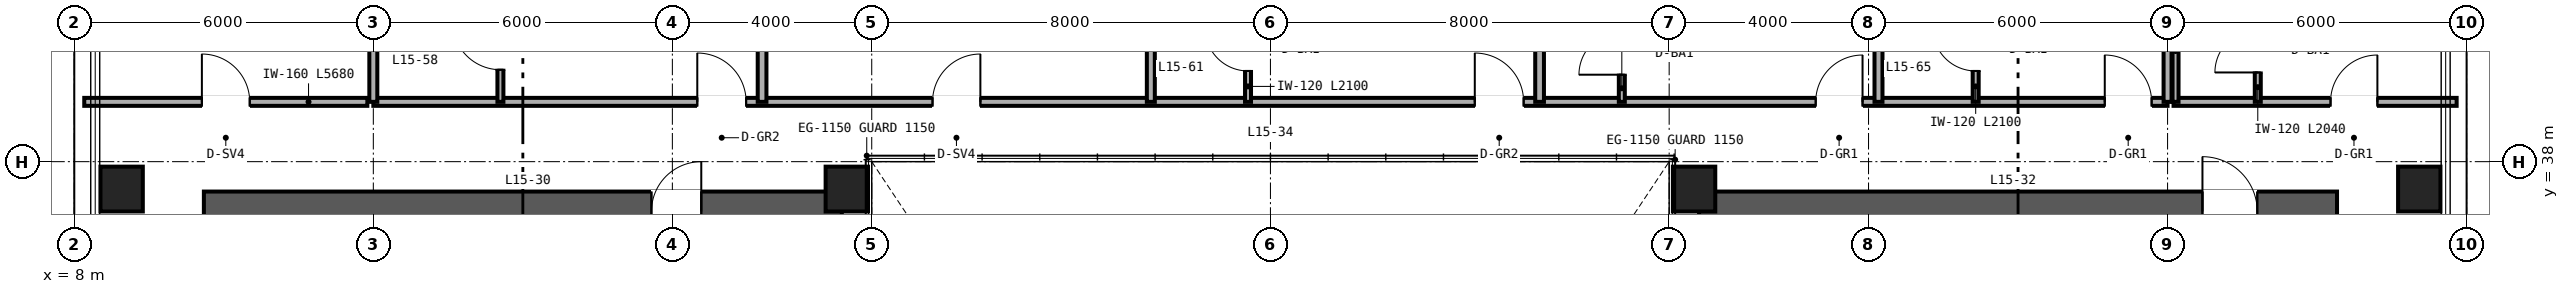
"""IFC4 building model, lengths in metres.
Left out: names, types, materials, properties, quantities, classifications, styles, units other than length and angle.
Written with IfcOpenShell. Run it as: python <this file> out.ifc"""

import sys

from ifc_helpers import new_model, si_unit, direction, frame, frame_2d, origin, origin_2d, place, context, subcontext, project, spatial, rectangle, hollow_rectangle, extrude, source, transform, mapped, element, fill, save


model = new_model("IFC4")
c1 = context("Model", 3, precision=1e-05, world=origin(), true_north=direction((0.0, 1.0)))
c2 = subcontext(c1, "Body", "Model", "MODEL_VIEW")
j1 = project(units=[si_unit("LENGTHUNIT", "METRE"), si_unit("PLANEANGLEUNIT", "RADIAN")], contexts=[c1])
p1 = place(None, origin())
s1 = spatial("IfcSite", under=j1, at=p1, CompositionType="ELEMENT")
p2 = place(p1, origin())
s2 = spatial("IfcBuilding", under=s1, at=p2, CompositionType="ELEMENT")
p3 = place(p2, frame((0.0, 0.0, 63.6)))
s3 = spatial("IfcBuildingStorey", under=s2, at=p3, CompositionType="ELEMENT", Elevation=63.6)
p4 = place(p3, frame((10.6, 37.0, 0.0), z_axis=(0.0, 0.0, 1.0), x_axis=(1.0, 0.0, 0.0)))
e1 = element("IfcWall", 1, at=p4, inside=s3, PredefinedType="SHEAR", context=c2, shape_type="SweptSolid", body=[
    extrude(rectangle(XDim=12.8, YDim=0.8, at=frame_2d((6.4, 0.0))), origin(), (0.0, 0.0, 1.0), 3.35),
])
p5 = place(p4, frame((8.98, 0.0, 0.0)))
e2 = element("IfcOpeningElement", 2, at=p5, cuts=e1, PredefinedType="OPENING", context=c2, shape_type="SweptSolid", body=[
    extrude(rectangle(XDim=1.0, YDim=2.15, at=frame_2d((0.5, 1.075))), frame((0.0, 0.41, 0.0), z_axis=(0.0, -1.0, 0.0), x_axis=(1.0, 0.0, 0.0)), (0.0, 0.0, 1.0), 0.82),
])
p6 = place(p3, frame((40.6, 37.0, 0.0), z_axis=(0.0, 0.0, 1.0), x_axis=(1.0, 0.0, 0.0)))
e3 = element("IfcWall", 3, at=p6, inside=s3, PredefinedType="SHEAR", context=c2, shape_type="SweptSolid", body=[
    extrude(rectangle(XDim=12.8, YDim=0.8, at=frame_2d((6.4, 0.0))), origin(), (0.0, 0.0, 1.0), 3.35),
])
p7 = place(p6, frame((10.1, 0.0, 0.0)))
e4 = element("IfcOpeningElement", 4, at=p7, cuts=e3, PredefinedType="OPENING", context=c2, shape_type="SweptSolid", body=[
    extrude(rectangle(XDim=1.1, YDim=2.15, at=frame_2d((0.55, 1.075))), frame((0.0, 0.41, 0.0), z_axis=(0.0, -1.0, 0.0), x_axis=(1.0, 0.0, 0.0)), (0.0, 0.0, 1.0), 0.82),
])
m1 = source(origin(), c2, "Body", "SweptSolid", [
    extrude(hollow_rectangle(XDim=0.85, YDim=0.9, WallThickness=0.04, at=origin_2d()), origin(), (0.0, 0.0, 1.0), 3.35),
])
for number, where, z_axis, x_axis in (
    (5, (8.95, 37.45, 0.0), (0.0, 0.0, 1.0), (1.0, 0.0, 0.0)),
    (6, (23.5, 37.45, 0.0), (0.0, 0.0, 1.0), (1.0, 0.0, 0.0)),
    (7, (40.5, 37.45, 0.0), (0.0, 0.0, 1.0), (1.0, 0.0, 0.0)),
    (8, (55.05, 37.45, 0.0), (0.0, 0.0, 1.0), (1.0, 0.0, 0.0)),
):
    element("IfcColumn", number, at=place(p3, frame(where, z_axis=z_axis, x_axis=x_axis)), inside=s3, PredefinedType="COLUMN", context=c2, shape_type="MappedRepresentation", body=[
        mapped(m1, transform((0.0, 0.0, 0.0), scale=1.0)),
    ])
p8 = place(p3, frame((8.2, 39.2, 0.0), z_axis=(0.0, 0.0, 1.0), x_axis=(1.0, 0.0, 0.0)))
e9 = element("IfcWall", 9, at=p8, inside=s3, PredefinedType="PARTITIONING", context=c2, shape_type="SweptSolid", body=[
    extrude(rectangle(XDim=5.68, YDim=0.16, at=frame_2d((2.84, 0.0))), origin(), (0.0, 0.0, 1.0), 3.35),
])
p9 = place(p8, frame((2.36, 0.0, 0.0)))
e10 = element("IfcOpeningElement", 10, at=p9, cuts=e9, PredefinedType="OPENING", context=c2, shape_type="SweptSolid", body=[
    extrude(rectangle(XDim=0.96, YDim=2.15, at=frame_2d((0.48, 1.075))), frame((0.0, 0.09, 0.0), z_axis=(0.0, -1.0, 0.0), x_axis=(1.0, 0.0, 0.0)), (0.0, 0.0, 1.0), 0.18),
])
p10 = place(p3, frame((50.12, 39.2, 0.0), z_axis=(0.0, 0.0, 1.0), x_axis=(1.0, 0.0, 0.0)))
e11 = element("IfcWall", 11, at=p10, inside=s3, PredefinedType="PARTITIONING", context=c2, shape_type="SweptSolid", body=[
    extrude(rectangle(XDim=5.68, YDim=0.16, at=frame_2d((2.84, 0.0))), origin(), (0.0, 0.0, 1.0), 3.35),
])
p11 = place(p10, frame((3.15, 0.0, 0.0)))
e12 = element("IfcOpeningElement", 12, at=p11, cuts=e11, PredefinedType="OPENING", context=c2, shape_type="SweptSolid", body=[
    extrude(rectangle(XDim=0.94, YDim=2.15, at=frame_2d((0.47, 1.075))), frame((0.0, 0.09, 0.0), z_axis=(0.0, -1.0, 0.0), x_axis=(1.0, 0.0, 0.0)), (0.0, 0.0, 1.0), 0.18),
])
p12 = place(p3, frame((51.81, 39.2, 0.0), z_axis=(0.0, 0.0, 1.0), x_axis=(0.0, 1.0, 0.0)))
e13 = element("IfcWall", 13, at=p12, inside=s3, PredefinedType="PARTITIONING", context=c2, shape_type="SweptSolid", body=[
    extrude(rectangle(XDim=2.04, YDim=0.12, at=frame_2d((1.02, 0.0))), origin(), (0.0, 0.0, 1.0), 3.35),
])
p13 = place(p12, frame((0.59, 0.0, 0.0)))
e14 = element("IfcOpeningElement", 14, at=p13, cuts=e13, PredefinedType="OPENING", context=c2, shape_type="SweptSolid", body=[
    extrude(rectangle(XDim=0.86, YDim=2.1, at=frame_2d((0.43, 1.05))), frame((0.0, 0.07, 0.0), z_axis=(0.0, -1.0, 0.0), x_axis=(1.0, 0.0, 0.0)), (0.0, 0.0, 1.0), 0.14),
])
p14 = place(p3, frame((50.16, 39.2, 0.0), z_axis=(0.0, 0.0, 1.0), x_axis=(0.0, 1.0, 0.0)))
e15 = element("IfcWall", 15, at=p14, inside=s3, PredefinedType="PARTITIONING", context=c2, shape_type="SweptSolid", body=[
    extrude(rectangle(XDim=2.04, YDim=0.12, at=frame_2d((1.02, 0.0))), origin(), (0.0, 0.0, 1.0), 3.35),
])
p15 = place(p3, frame((14.0, 39.2, 0.0), z_axis=(0.0, 0.0, 1.0), x_axis=(1.0, 0.0, 0.0)))
e16 = element("IfcWall", 16, at=p15, inside=s3, PredefinedType="PARTITIONING", context=c2, shape_type="SweptSolid", body=[
    extrude(rectangle(XDim=36.0, YDim=0.16, at=frame_2d((18.0, 0.0))), origin(), (0.0, 0.0, 1.0), 2.571),
])
p16 = place(p15, frame((6.5, 0.0, 0.0)))
e17 = element("IfcOpeningElement", 17, at=p16, cuts=e16, PredefinedType="OPENING", context=c2, shape_type="SweptSolid", body=[
    extrude(rectangle(XDim=0.98, YDim=2.2, at=frame_2d((0.49, 1.1))), frame((0.0, 0.09, 0.0), z_axis=(0.0, -1.0, 0.0), x_axis=(1.0, 0.0, 0.0)), (0.0, 0.0, 1.0), 0.18),
])
p17 = place(p15, frame((11.22, 0.0, 0.0)))
e18 = element("IfcOpeningElement", 18, at=p17, cuts=e16, PredefinedType="OPENING", context=c2, shape_type="SweptSolid", body=[
    extrude(rectangle(XDim=0.96, YDim=2.15, at=frame_2d((0.48, 1.075))), frame((0.0, 0.09, 0.0), z_axis=(0.0, -1.0, 0.0), x_axis=(1.0, 0.0, 0.0)), (0.0, 0.0, 1.0), 0.18),
])
p18 = place(p15, frame((22.1, 0.0, 0.0)))
e19 = element("IfcOpeningElement", 19, at=p18, cuts=e16, PredefinedType="OPENING", context=c2, shape_type="SweptSolid", body=[
    extrude(rectangle(XDim=0.98, YDim=2.2, at=frame_2d((0.49, 1.1))), frame((0.0, 0.09, 0.0), z_axis=(0.0, -1.0, 0.0), x_axis=(1.0, 0.0, 0.0)), (0.0, 0.0, 1.0), 0.18),
])
p19 = place(p15, frame((28.94, 0.0, 0.0)))
e20 = element("IfcOpeningElement", 20, at=p19, cuts=e16, PredefinedType="OPENING", context=c2, shape_type="SweptSolid", body=[
    extrude(rectangle(XDim=0.94, YDim=2.15, at=frame_2d((0.47, 1.075))), frame((0.0, 0.09, 0.0), z_axis=(0.0, -1.0, 0.0), x_axis=(1.0, 0.0, 0.0)), (0.0, 0.0, 1.0), 0.18),
])
p20 = place(p15, frame((34.74, 0.0, 0.0)))
e21 = element("IfcOpeningElement", 21, at=p20, cuts=e16, PredefinedType="OPENING", context=c2, shape_type="SweptSolid", body=[
    extrude(rectangle(XDim=0.94, YDim=2.15, at=frame_2d((0.47, 1.075))), frame((0.0, 0.09, 0.0), z_axis=(0.0, -1.0, 0.0), x_axis=(1.0, 0.0, 0.0)), (0.0, 0.0, 1.0), 0.18),
])
for number, where, z_axis, x_axis in (
    (22, (14.0, 39.2, 0.0), (0.0, 0.0, 1.0), (0.0, 1.0, 0.0)),
    (23, (50.0, 39.2, 0.0), (0.0, 0.0, 1.0), (0.0, 1.0, 0.0)),
):
    element("IfcWall", number, at=place(p3, frame(where, z_axis=z_axis, x_axis=x_axis)), inside=s3, PredefinedType="PARTITIONING", context=c2, shape_type="SweptSolid", body=[
        extrude(rectangle(XDim=10.44, YDim=0.16, at=frame_2d((5.22, 0.0))), origin(), (0.0, 0.0, 1.0), 2.657),
    ])
p21 = place(p3, frame((21.8, 39.2, 0.0), z_axis=(0.0, 0.0, 1.0), x_axis=(0.0, 1.0, 0.0)))
e24 = element("IfcWall", 24, at=p21, inside=s3, PredefinedType="PARTITIONING", context=c2, shape_type="SweptSolid", body=[
    extrude(rectangle(XDim=10.44, YDim=0.175, at=frame_2d((5.22, 0.0))), origin(), (0.0, 0.0, 1.0), 2.813),
])
p22 = place(p3, frame((16.55, 39.2, 0.0), z_axis=(0.0, 0.0, 1.0), x_axis=(0.0, 1.0, 0.0)))
e25 = element("IfcWall", 25, at=p22, inside=s3, PredefinedType="PARTITIONING", context=c2, shape_type="SweptSolid", body=[
    extrude(rectangle(XDim=2.25, YDim=0.12, at=frame_2d((1.125, 0.0))), origin(), (0.0, 0.0, 1.0), 3.35),
])
p23 = place(p22, frame((0.645, 0.0, 0.0)))
e26 = element("IfcOpeningElement", 26, at=p23, cuts=e25, PredefinedType="OPENING", context=c2, shape_type="SweptSolid", body=[
    extrude(rectangle(XDim=0.96, YDim=2.15, at=frame_2d((0.48, 1.075))), frame((0.0, 0.07, 0.0), z_axis=(0.0, -1.0, 0.0), x_axis=(1.0, 0.0, 0.0)), (0.0, 0.0, 1.0), 0.14),
])
p24 = place(p3, frame((29.6, 39.2, 0.0), z_axis=(0.0, 0.0, 1.0), x_axis=(0.0, 1.0, 0.0)))
e27 = element("IfcWall", 27, at=p24, inside=s3, PredefinedType="PARTITIONING", context=c2, shape_type="SweptSolid", body=[
    extrude(rectangle(XDim=10.44, YDim=0.16, at=frame_2d((5.22, 0.0))), origin(), (0.0, 0.0, 1.0), 2.423),
])
p25 = place(p3, frame((37.4, 39.2, 0.0), z_axis=(0.0, 0.0, 1.0), x_axis=(0.0, 1.0, 0.0)))
e28 = element("IfcWall", 28, at=p25, inside=s3, PredefinedType="PARTITIONING", context=c2, shape_type="SweptSolid", body=[
    extrude(rectangle(XDim=10.44, YDim=0.175, at=frame_2d((5.22, 0.0))), origin(), (0.0, 0.0, 1.0), 2.423),
])
p26 = place(p3, frame((31.55, 39.2, 0.0), z_axis=(0.0, 0.0, 1.0), x_axis=(0.0, 1.0, 0.0)))
e29 = element("IfcWall", 29, at=p26, inside=s3, PredefinedType="PARTITIONING", context=c2, shape_type="SweptSolid", body=[
    extrude(rectangle(XDim=2.1, YDim=0.12, at=frame_2d((1.05, 0.0))), origin(), (0.0, 0.0, 1.0), 3.35),
])
p27 = place(p26, frame((0.62, 0.0, 0.0)))
e30 = element("IfcOpeningElement", 30, at=p27, cuts=e29, PredefinedType="OPENING", context=c2, shape_type="SweptSolid", body=[
    extrude(rectangle(XDim=0.86, YDim=2.1, at=frame_2d((0.43, 1.05))), frame((0.0, 0.07, 0.0), z_axis=(0.0, -1.0, 0.0), x_axis=(1.0, 0.0, 0.0)), (0.0, 0.0, 1.0), 0.14),
])
p28 = place(p3, frame((44.2, 39.2, 0.0), z_axis=(0.0, 0.0, 1.0), x_axis=(0.0, 1.0, 0.0)))
e31 = element("IfcWall", 31, at=p28, inside=s3, PredefinedType="PARTITIONING", context=c2, shape_type="SweptSolid", body=[
    extrude(rectangle(XDim=10.44, YDim=0.16, at=frame_2d((5.22, 0.0))), origin(), (0.0, 0.0, 1.0), 2.657),
])
p29 = place(p3, frame((39.05, 39.2, 0.0), z_axis=(0.0, 0.0, 1.0), x_axis=(0.0, 1.0, 0.0)))
e32 = element("IfcWall", 32, at=p29, inside=s3, PredefinedType="PARTITIONING", context=c2, shape_type="SweptSolid", body=[
    extrude(rectangle(XDim=1.95, YDim=0.12, at=frame_2d((0.975, 0.0))), origin(), (0.0, 0.0, 1.0), 3.35),
])
p30 = place(p29, frame((0.545, 0.0, 0.0)))
e33 = element("IfcOpeningElement", 33, at=p30, cuts=e32, PredefinedType="OPENING", context=c2, shape_type="SweptSolid", body=[
    extrude(rectangle(XDim=0.86, YDim=2.1, at=frame_2d((0.43, 1.05))), frame((0.0, 0.07, 0.0), z_axis=(0.0, -1.0, 0.0), x_axis=(1.0, 0.0, 0.0)), (0.0, 0.0, 1.0), 0.14),
])
p31 = place(p3, frame((46.15, 39.2, 0.0), z_axis=(0.0, 0.0, 1.0), x_axis=(0.0, 1.0, 0.0)))
e34 = element("IfcWall", 34, at=p31, inside=s3, PredefinedType="PARTITIONING", context=c2, shape_type="SweptSolid", body=[
    extrude(rectangle(XDim=2.1, YDim=0.12, at=frame_2d((1.05, 0.0))), origin(), (0.0, 0.0, 1.0), 3.35),
])
p32 = place(p31, frame((0.62, 0.0, 0.0)))
e35 = element("IfcOpeningElement", 35, at=p32, cuts=e34, PredefinedType="OPENING", context=c2, shape_type="SweptSolid", body=[
    extrude(rectangle(XDim=0.86, YDim=2.1, at=frame_2d((0.43, 1.05))), frame((0.0, 0.07, 0.0), z_axis=(0.0, -1.0, 0.0), x_axis=(1.0, 0.0, 0.0)), (0.0, 0.0, 1.0), 0.14),
])
m2 = source(origin(), c2, "Body", "SweptSolid", [
    extrude(rectangle(XDim=1.0, YDim=2.15, at=frame_2d((0.5, 1.075))), frame((0.0, 0.025, 0.0), z_axis=(0.0, -1.0, 0.0), x_axis=(1.0, 0.0, 0.0)), (0.0, 0.0, 1.0), 0.05),
])
p33 = place(p5, origin())
e36 = element("IfcDoor", 36, at=p33, inside=s3, OperationType="SINGLE_SWING_RIGHT", PredefinedType="DOOR", context=c2, shape_type="MappedRepresentation", body=[
    mapped(m2, transform((0.0, 0.0, 0.0), scale=1.0)),
])
fill(e2, e36)
m3 = source(origin(), c2, "Body", "SweptSolid", [
    extrude(rectangle(XDim=1.1, YDim=2.15, at=frame_2d((0.55, 1.075))), frame((0.0, 0.025, 0.0), z_axis=(0.0, -1.0, 0.0), x_axis=(1.0, 0.0, 0.0)), (0.0, 0.0, 1.0), 0.05),
])
p34 = place(p7, origin())
e37 = element("IfcDoor", 37, at=p34, inside=s3, OperationType="SINGLE_SWING_LEFT", PredefinedType="DOOR", context=c2, shape_type="MappedRepresentation", body=[
    mapped(m3, transform((0.0, 0.0, 0.0), scale=1.0)),
])
fill(e4, e37)
m4 = source(origin(), c2, "Body", "SweptSolid", [
    extrude(rectangle(XDim=0.96, YDim=2.15, at=frame_2d((0.48, 1.075))), frame((0.0, 0.025, 0.0), z_axis=(0.0, -1.0, 0.0), x_axis=(1.0, 0.0, 0.0)), (0.0, 0.0, 1.0), 0.05),
])
p35 = place(p9, origin())
e38 = element("IfcDoor", 38, at=p35, inside=s3, OperationType="SINGLE_SWING_LEFT", PredefinedType="DOOR", context=c2, shape_type="MappedRepresentation", body=[
    mapped(m4, transform((0.0, 0.0, 0.0), scale=1.0)),
])
fill(e10, e38)
m5 = source(origin(), c2, "Body", "SweptSolid", [
    extrude(rectangle(XDim=0.86, YDim=2.1, at=frame_2d((0.43, 1.05))), frame((0.0, 0.025, 0.0), z_axis=(0.0, -1.0, 0.0), x_axis=(1.0, 0.0, 0.0)), (0.0, 0.0, 1.0), 0.05),
])
p36 = place(p13, origin())
e39 = element("IfcDoor", 39, at=p36, inside=s3, OperationType="SINGLE_SWING_LEFT", PredefinedType="DOOR", context=c2, shape_type="MappedRepresentation", body=[
    mapped(m5, transform((0.0, 0.0, 0.0), scale=1.0)),
])
fill(e14, e39)
m6 = source(origin(), c2, "Body", "SweptSolid", [
    extrude(rectangle(XDim=0.94, YDim=2.15, at=frame_2d((0.47, 1.075))), frame((0.0, 0.025, 0.0), z_axis=(0.0, -1.0, 0.0), x_axis=(1.0, 0.0, 0.0)), (0.0, 0.0, 1.0), 0.05),
])
p37 = place(p11, origin())
e40 = element("IfcDoor", 40, at=p37, inside=s3, OperationType="SINGLE_SWING_RIGHT", PredefinedType="DOOR", context=c2, shape_type="MappedRepresentation", body=[
    mapped(m6, transform((0.0, 0.0, 0.0), scale=1.0)),
])
fill(e12, e40)
p38 = place(p23, origin())
e41 = element("IfcDoor", 41, at=p38, inside=s3, OperationType="SINGLE_SWING_RIGHT", PredefinedType="DOOR", context=c2, shape_type="MappedRepresentation", body=[
    mapped(m4, transform((0.0, 0.0, 0.0), scale=1.0)),
])
fill(e26, e41)
p39 = place(p27, origin())
e42 = element("IfcDoor", 42, at=p39, inside=s3, OperationType="SINGLE_SWING_RIGHT", PredefinedType="DOOR", context=c2, shape_type="MappedRepresentation", body=[
    mapped(m5, transform((0.0, 0.0, 0.0), scale=1.0)),
])
fill(e30, e42)
p40 = place(p30, origin())
e43 = element("IfcDoor", 43, at=p40, inside=s3, OperationType="SINGLE_SWING_LEFT", PredefinedType="DOOR", context=c2, shape_type="MappedRepresentation", body=[
    mapped(m5, transform((0.0, 0.0, 0.0), scale=1.0)),
])
fill(e33, e43)
p41 = place(p32, origin())
e44 = element("IfcDoor", 44, at=p41, inside=s3, OperationType="SINGLE_SWING_RIGHT", PredefinedType="DOOR", context=c2, shape_type="MappedRepresentation", body=[
    mapped(m5, transform((0.0, 0.0, 0.0), scale=1.0)),
])
fill(e35, e44)
m7 = source(origin(), c2, "Body", "SweptSolid", [
    extrude(rectangle(XDim=0.98, YDim=2.2, at=frame_2d((0.49, 1.1))), frame((0.0, 0.025, 0.0), z_axis=(0.0, -1.0, 0.0), x_axis=(1.0, 0.0, 0.0)), (0.0, 0.0, 1.0), 0.05),
])
p42 = place(p16, origin())
e45 = element("IfcDoor", 45, at=p42, inside=s3, OperationType="SINGLE_SWING_LEFT", PredefinedType="DOOR", context=c2, shape_type="MappedRepresentation", body=[
    mapped(m7, transform((0.0, 0.0, 0.0), scale=1.0)),
])
fill(e17, e45)
p43 = place(p17, origin())
e46 = element("IfcDoor", 46, at=p43, inside=s3, OperationType="SINGLE_SWING_RIGHT", PredefinedType="DOOR", context=c2, shape_type="MappedRepresentation", body=[
    mapped(m4, transform((0.0, 0.0, 0.0), scale=1.0)),
])
fill(e18, e46)
p44 = place(p18, origin())
e47 = element("IfcDoor", 47, at=p44, inside=s3, OperationType="SINGLE_SWING_LEFT", PredefinedType="DOOR", context=c2, shape_type="MappedRepresentation", body=[
    mapped(m7, transform((0.0, 0.0, 0.0), scale=1.0)),
])
fill(e19, e47)
p45 = place(p19, origin())
e48 = element("IfcDoor", 48, at=p45, inside=s3, OperationType="SINGLE_SWING_RIGHT", PredefinedType="DOOR", context=c2, shape_type="MappedRepresentation", body=[
    mapped(m6, transform((0.0, 0.0, 0.0), scale=1.0)),
])
fill(e20, e48)
p46 = place(p20, origin())
e49 = element("IfcDoor", 49, at=p46, inside=s3, OperationType="SINGLE_SWING_LEFT", PredefinedType="DOOR", context=c2, shape_type="MappedRepresentation", body=[
    mapped(m6, transform((0.0, 0.0, 0.0), scale=1.0)),
])
fill(e21, e49)
save(model, sys.argv[1])
